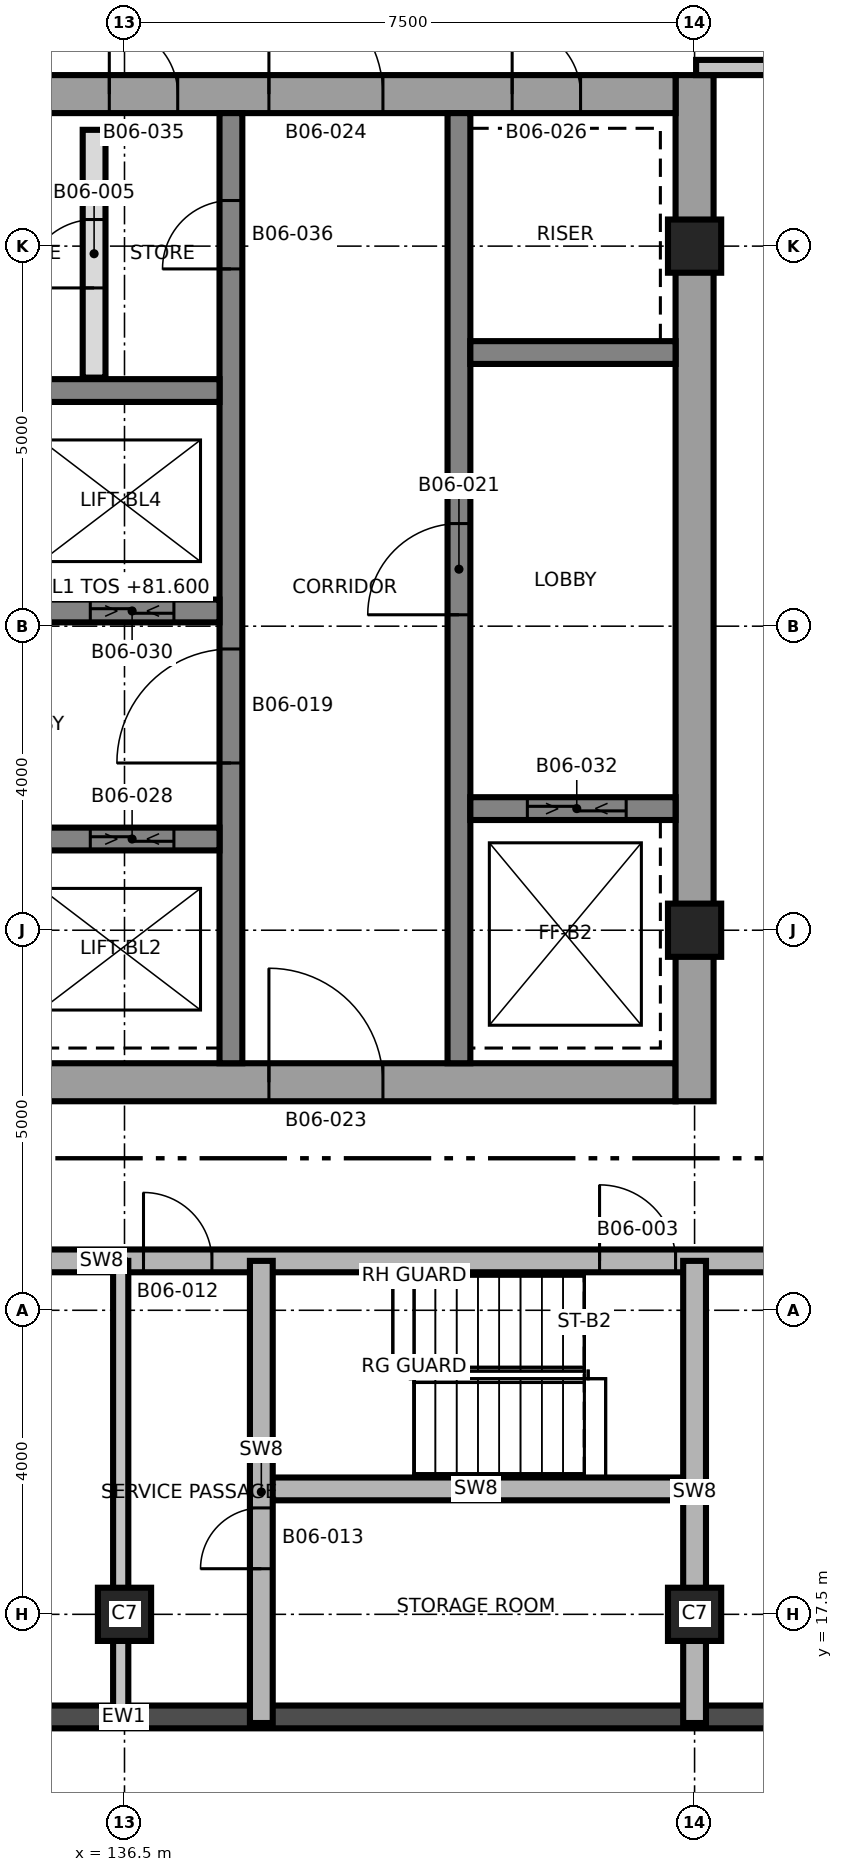
"""IFC4 building model, lengths in metres.
Left out: names, types, materials, properties, quantities, classifications, styles, units other than length and angle.
Written with IfcOpenShell. Run it as: python <this file> out.ifc"""

import sys

from ifc_helpers import new_model, si_unit, direction, frame, frame_2d, origin, origin_2d, place, context, subcontext, project, spatial, rectangle, extrude, element, fill, save


model = new_model("IFC4")
c1 = context("Model", 3, precision=1e-05, world=origin(), true_north=direction((0.0, 1.0)))
c2 = subcontext(c1, "Body", "Model", "MODEL_VIEW")
j1 = project(units=[si_unit("LENGTHUNIT", "METRE"), si_unit("PLANEANGLEUNIT", "RADIAN")], contexts=[c1])
p1 = place(None, origin())
s1 = spatial("IfcSite", under=j1, at=p1, CompositionType="ELEMENT")
p2 = place(p1, origin())
s2 = spatial("IfcBuilding", under=s1, at=p2, CompositionType="ELEMENT")
p3 = place(p2, frame((0.0, 0.0, 81.6)))
s3 = spatial("IfcBuildingStorey", under=s2, at=p3, CompositionType="ELEMENT", Elevation=81.6)
p4 = place(p3, frame((128.75, 24.5, 0.0), z_axis=(0.0, 0.0, 1.0), x_axis=(1.0, 0.0, 0.0)))
e1 = element("IfcWall", 1, at=p4, inside=s3, PredefinedType="SHEAR", context=c2, shape_type="SweptSolid", body=[
    extrude(rectangle(XDim=15.0, YDim=0.5, at=frame_2d((7.5, 0.0))), origin(), (0.0, 0.0, 1.0), 5.5),
])
p5 = place(p4, frame((9.65, 0.0, 0.0)))
e2 = element("IfcOpeningElement", 2, at=p5, cuts=e1, PredefinedType="OPENING", context=c2, shape_type="SweptSolid", body=[
    extrude(rectangle(XDim=1.5, YDim=2.1, at=frame_2d((0.75, 1.05))), frame((0.0, 0.26, 0.0), z_axis=(0.0, -1.0, 0.0), x_axis=(1.0, 0.0, 0.0)), (0.0, 0.0, 1.0), 0.52),
])
p6 = place(p4, frame((1.25, 0.0, 0.0)))
e3 = element("IfcOpeningElement", 3, at=p6, cuts=e1, PredefinedType="OPENING", context=c2, shape_type="SweptSolid", body=[
    extrude(rectangle(XDim=0.9, YDim=2.1, at=frame_2d((0.45, 1.05))), frame((0.0, 0.26, 0.0), z_axis=(0.0, -1.0, 0.0), x_axis=(1.0, 0.0, 0.0)), (0.0, 0.0, 1.0), 0.52),
])
p7 = place(p3, frame((144.0, 24.25, 0.0), z_axis=(0.0, 0.0, 1.0), x_axis=(0.0, 1.0, 0.0)))
e4 = element("IfcWall", 4, at=p7, inside=s3, PredefinedType="SHEAR", context=c2, shape_type="SweptSolid", body=[
    extrude(rectangle(XDim=13.5, YDim=0.5, at=frame_2d((6.75, 0.0))), origin(), (0.0, 0.0, 1.0), 5.5),
])
p8 = place(p3, frame((128.75, 37.5, 0.0), z_axis=(0.0, 0.0, 1.0), x_axis=(1.0, 0.0, 0.0)))
e5 = element("IfcWall", 5, at=p8, inside=s3, PredefinedType="SHEAR", context=c2, shape_type="SweptSolid", body=[
    extrude(rectangle(XDim=15.0, YDim=0.5, at=frame_2d((7.5, 0.0))), origin(), (0.0, 0.0, 1.0), 5.5),
])
p9 = place(p8, frame((9.65, 0.0, 0.0)))
e6 = element("IfcOpeningElement", 6, at=p9, cuts=e5, PredefinedType="OPENING", context=c2, shape_type="SweptSolid", body=[
    extrude(rectangle(XDim=1.5, YDim=2.1, at=frame_2d((0.75, 1.05))), frame((0.0, 0.26, 0.0), z_axis=(0.0, -1.0, 0.0), x_axis=(1.0, 0.0, 0.0)), (0.0, 0.0, 1.0), 0.52),
])
p10 = place(p8, frame((12.85, 0.0, 0.0)))
e7 = element("IfcOpeningElement", 7, at=p10, cuts=e5, PredefinedType="OPENING", context=c2, shape_type="SweptSolid", body=[
    extrude(rectangle(XDim=0.9, YDim=2.1, at=frame_2d((0.45, 1.05))), frame((0.0, 0.26, 0.0), z_axis=(0.0, -1.0, 0.0), x_axis=(1.0, 0.0, 0.0)), (0.0, 0.0, 1.0), 0.52),
])
p11 = place(p8, frame((3.8, 0.0, 0.0)))
e8 = element("IfcOpeningElement", 8, at=p11, cuts=e5, PredefinedType="OPENING", context=c2, shape_type="SweptSolid", body=[
    extrude(rectangle(XDim=0.9, YDim=2.1, at=frame_2d((0.45, 1.05))), frame((0.0, 0.26, 0.0), z_axis=(0.0, -1.0, 0.0), x_axis=(1.0, 0.0, 0.0)), (0.0, 0.0, 1.0), 0.52),
])
p12 = place(p8, frame((5.8, 0.0, 0.0)))
e9 = element("IfcOpeningElement", 9, at=p12, cuts=e5, PredefinedType="OPENING", context=c2, shape_type="SweptSolid", body=[
    extrude(rectangle(XDim=0.9, YDim=2.1, at=frame_2d((0.45, 1.05))), frame((0.0, 0.26, 0.0), z_axis=(0.0, -1.0, 0.0), x_axis=(1.0, 0.0, 0.0)), (0.0, 0.0, 1.0), 0.52),
])
p13 = place(p8, frame((7.55, 0.0, 0.0)))
e10 = element("IfcOpeningElement", 10, at=p13, cuts=e5, PredefinedType="OPENING", context=c2, shape_type="SweptSolid", body=[
    extrude(rectangle(XDim=0.9, YDim=2.1, at=frame_2d((0.45, 1.05))), frame((0.0, 0.26, 0.0), z_axis=(0.0, -1.0, 0.0), x_axis=(1.0, 0.0, 0.0)), (0.0, 0.0, 1.0), 0.52),
])
p14 = place(p3, frame((137.9, 24.75, 0.0), z_axis=(0.0, 0.0, 1.0), x_axis=(0.0, 1.0, 0.0)))
e11 = element("IfcWall", 11, at=p14, inside=s3, PredefinedType="SHEAR", context=c2, shape_type="SweptSolid", body=[
    extrude(rectangle(XDim=12.5, YDim=0.3, at=frame_2d((6.25, 0.0))), origin(), (0.0, 0.0, 1.0), 5.5),
])
p15 = place(p14, frame((3.95, 0.0, 0.0)))
e12 = element("IfcOpeningElement", 12, at=p15, cuts=e11, PredefinedType="OPENING", context=c2, shape_type="SweptSolid", body=[
    extrude(rectangle(XDim=1.5, YDim=2.1, at=frame_2d((0.75, 1.05))), frame((0.0, 0.16, 0.0), z_axis=(0.0, -1.0, 0.0), x_axis=(1.0, 0.0, 0.0)), (0.0, 0.0, 1.0), 0.32),
])
p16 = place(p14, frame((10.45, 0.0, 0.0)))
e13 = element("IfcOpeningElement", 13, at=p16, cuts=e11, PredefinedType="OPENING", context=c2, shape_type="SweptSolid", body=[
    extrude(rectangle(XDim=0.9, YDim=2.1, at=frame_2d((0.45, 1.05))), frame((0.0, 0.16, 0.0), z_axis=(0.0, -1.0, 0.0), x_axis=(1.0, 0.0, 0.0)), (0.0, 0.0, 1.0), 0.32),
])
p17 = place(p3, frame((140.9, 24.75, 0.0), z_axis=(0.0, 0.0, 1.0), x_axis=(0.0, 1.0, 0.0)))
e14 = element("IfcWall", 14, at=p17, inside=s3, PredefinedType="SHEAR", context=c2, shape_type="SweptSolid", body=[
    extrude(rectangle(XDim=12.5, YDim=0.3, at=frame_2d((6.25, 0.0))), origin(), (0.0, 0.0, 1.0), 5.5),
])
p18 = place(p17, frame((5.9, 0.0, 0.0)))
e15 = element("IfcOpeningElement", 15, at=p18, cuts=e14, PredefinedType="OPENING", context=c2, shape_type="SweptSolid", body=[
    extrude(rectangle(XDim=1.2, YDim=2.1, at=frame_2d((0.6, 1.05))), frame((0.0, 0.16, 0.0), z_axis=(0.0, -1.0, 0.0), x_axis=(1.0, 0.0, 0.0)), (0.0, 0.0, 1.0), 0.32),
])
p19 = place(p3, frame((132.25, 27.7, 0.0), z_axis=(0.0, 0.0, 1.0), x_axis=(1.0, 0.0, 0.0)))
e16 = element("IfcWall", 16, at=p19, inside=s3, PredefinedType="SHEAR", context=c2, shape_type="SweptSolid", body=[
    extrude(rectangle(XDim=5.5, YDim=0.3, at=frame_2d((2.75, 0.0))), origin(), (0.0, 0.0, 1.0), 5.5),
])
p20 = place(p19, frame((0.9, 0.0, 0.0)))
e17 = element("IfcOpeningElement", 17, at=p20, cuts=e16, PredefinedType="OPENING", context=c2, shape_type="SweptSolid", body=[
    extrude(rectangle(XDim=1.1, YDim=2.4, at=frame_2d((0.55, 1.2))), frame((0.0, 0.16, 0.0), z_axis=(0.0, -1.0, 0.0), x_axis=(1.0, 0.0, 0.0)), (0.0, 0.0, 1.0), 0.32),
])
p21 = place(p19, frame((3.8, 0.0, 0.0)))
e18 = element("IfcOpeningElement", 18, at=p21, cuts=e16, PredefinedType="OPENING", context=c2, shape_type="SweptSolid", body=[
    extrude(rectangle(XDim=1.1, YDim=2.4, at=frame_2d((0.55, 1.2))), frame((0.0, 0.16, 0.0), z_axis=(0.0, -1.0, 0.0), x_axis=(1.0, 0.0, 0.0)), (0.0, 0.0, 1.0), 0.32),
])
p22 = place(p3, frame((132.25, 30.7, 0.0), z_axis=(0.0, 0.0, 1.0), x_axis=(1.0, 0.0, 0.0)))
e19 = element("IfcWall", 19, at=p22, inside=s3, PredefinedType="SHEAR", context=c2, shape_type="SweptSolid", body=[
    extrude(rectangle(XDim=5.5, YDim=0.3, at=frame_2d((2.75, 0.0))), origin(), (0.0, 0.0, 1.0), 5.5),
])
p23 = place(p22, frame((0.9, 0.0, 0.0)))
e20 = element("IfcOpeningElement", 20, at=p23, cuts=e19, PredefinedType="OPENING", context=c2, shape_type="SweptSolid", body=[
    extrude(rectangle(XDim=1.1, YDim=2.4, at=frame_2d((0.55, 1.2))), frame((0.0, 0.16, 0.0), z_axis=(0.0, -1.0, 0.0), x_axis=(1.0, 0.0, 0.0)), (0.0, 0.0, 1.0), 0.32),
])
p24 = place(p22, frame((3.8, 0.0, 0.0)))
e21 = element("IfcOpeningElement", 21, at=p24, cuts=e19, PredefinedType="OPENING", context=c2, shape_type="SweptSolid", body=[
    extrude(rectangle(XDim=1.1, YDim=2.4, at=frame_2d((0.55, 1.2))), frame((0.0, 0.16, 0.0), z_axis=(0.0, -1.0, 0.0), x_axis=(1.0, 0.0, 0.0)), (0.0, 0.0, 1.0), 0.32),
])
p25 = place(p3, frame((132.25, 33.6, 0.0), z_axis=(0.0, 0.0, 1.0), x_axis=(1.0, 0.0, 0.0)))
e22 = element("IfcWall", 22, at=p25, inside=s3, PredefinedType="SHEAR", context=c2, shape_type="SweptSolid", body=[
    extrude(rectangle(XDim=5.5, YDim=0.3, at=frame_2d((2.75, 0.0))), origin(), (0.0, 0.0, 1.0), 5.5),
])
p26 = place(p3, frame((141.05, 28.1, 0.0), z_axis=(0.0, 0.0, 1.0), x_axis=(1.0, 0.0, 0.0)))
e23 = element("IfcWall", 23, at=p26, inside=s3, PredefinedType="SHEAR", context=c2, shape_type="SweptSolid", body=[
    extrude(rectangle(XDim=2.7, YDim=0.3, at=frame_2d((1.35, 0.0))), origin(), (0.0, 0.0, 1.0), 5.5),
])
p27 = place(p26, frame((0.75, 0.0, 0.0)))
e24 = element("IfcOpeningElement", 24, at=p27, cuts=e23, PredefinedType="OPENING", context=c2, shape_type="SweptSolid", body=[
    extrude(rectangle(XDim=1.3, YDim=2.4, at=frame_2d((0.65, 1.2))), frame((0.0, 0.16, 0.0), z_axis=(0.0, -1.0, 0.0), x_axis=(1.0, 0.0, 0.0)), (0.0, 0.0, 1.0), 0.32),
])
p28 = place(p3, frame((141.05, 34.1, 0.0), z_axis=(0.0, 0.0, 1.0), x_axis=(1.0, 0.0, 0.0)))
e25 = element("IfcWall", 25, at=p28, inside=s3, PredefinedType="SHEAR", context=c2, shape_type="SweptSolid", body=[
    extrude(rectangle(XDim=2.7, YDim=0.3, at=frame_2d((1.35, 0.0))), origin(), (0.0, 0.0, 1.0), 5.5),
])
for number, where, z_axis, x_axis in (
    (26, (136.5, 17.5, 0.0), (0.0, 0.0, 1.0), (1.0, 0.0, 0.0)),
    (27, (144.0, 17.5, 0.0), (0.0, 0.0, 1.0), (1.0, 0.0, 0.0)),
    (28, (144.0, 26.5, 0.0), (0.0, 0.0, 1.0), (1.0, 0.0, 0.0)),
    (29, (144.0, 35.5, 0.0), (0.0, 0.0, 1.0), (1.0, 0.0, 0.0)),
):
    element("IfcColumn", number, at=place(p3, frame(where, z_axis=z_axis, x_axis=x_axis)), inside=s3, PredefinedType="COLUMN", context=c2, shape_type="SweptSolid", body=[
        extrude(rectangle(XDim=0.7, YDim=0.7, at=origin_2d()), origin(), (0.0, 0.0, 1.0), 5.5),
    ])
p29 = place(p3, frame((126.048, 16.15, 0.0), z_axis=(0.0, 0.0, 1.0), x_axis=(1.0, 0.0, 0.0)))
e30 = element("IfcWall", 30, at=p29, inside=s3, PredefinedType="SOLIDWALL", context=c2, shape_type="SweptSolid", body=[
    extrude(rectangle(XDim=20.88, YDim=0.3, at=frame_2d((10.44, 0.0))), origin(), (0.0, 0.0, 1.0), 5.2),
])
p30 = place(p3, frame((138.25, 19.15, 0.0), z_axis=(0.0, 0.0, 1.0), x_axis=(1.0, 0.0, 0.0)))
e31 = element("IfcWall", 31, at=p30, inside=s3, PredefinedType="SHEAR", context=c2, shape_type="SweptSolid", body=[
    extrude(rectangle(XDim=5.75, YDim=0.3, at=frame_2d((2.875, 0.0))), origin(), (0.0, 0.0, 1.0), 5.2),
])
p31 = place(p3, frame((120.07, 22.15, 0.0), z_axis=(0.0, 0.0, 1.0), x_axis=(1.0, 0.0, 0.0)))
e32 = element("IfcWall", 32, at=p31, inside=s3, PredefinedType="SHEAR", context=c2, shape_type="SweptSolid", body=[
    extrude(rectangle(XDim=32.86, YDim=0.3, at=frame_2d((16.43, 0.0))), origin(), (0.0, 0.0, 1.0), 5.2),
])
p32 = place(p31, frame((22.68, 0.0, 0.0)))
e33 = element("IfcOpeningElement", 33, at=p32, cuts=e32, PredefinedType="OPENING", context=c2, shape_type="SweptSolid", body=[
    extrude(rectangle(XDim=1.0, YDim=2.1, at=frame_2d((0.5, 1.05))), frame((0.0, 0.16, 0.0), z_axis=(0.0, -1.0, 0.0), x_axis=(1.0, 0.0, 0.0)), (0.0, 0.0, 1.0), 0.32),
])
p33 = place(p31, frame((6.73, 0.0, 0.0)))
e34 = element("IfcOpeningElement", 34, at=p33, cuts=e32, PredefinedType="OPENING", context=c2, shape_type="SweptSolid", body=[
    extrude(rectangle(XDim=1.4, YDim=2.1, at=frame_2d((0.7, 1.05))), frame((0.0, 0.16, 0.0), z_axis=(0.0, -1.0, 0.0), x_axis=(1.0, 0.0, 0.0)), (0.0, 0.0, 1.0), 0.32),
])
p34 = place(p31, frame((12.23, 0.0, 0.0)))
e35 = element("IfcOpeningElement", 35, at=p34, cuts=e32, PredefinedType="OPENING", context=c2, shape_type="SweptSolid", body=[
    extrude(rectangle(XDim=1.4, YDim=2.1, at=frame_2d((0.7, 1.05))), frame((0.0, 0.16, 0.0), z_axis=(0.0, -1.0, 0.0), x_axis=(1.0, 0.0, 0.0)), (0.0, 0.0, 1.0), 0.32),
])
p35 = place(p31, frame((25.23, 0.0, 0.0)))
e36 = element("IfcOpeningElement", 36, at=p35, cuts=e32, PredefinedType="OPENING", context=c2, shape_type="SweptSolid", body=[
    extrude(rectangle(XDim=1.4, YDim=2.1, at=frame_2d((0.7, 1.05))), frame((0.0, 0.16, 0.0), z_axis=(0.0, -1.0, 0.0), x_axis=(1.0, 0.0, 0.0)), (0.0, 0.0, 1.0), 0.32),
])
p36 = place(p31, frame((16.68, 0.0, 0.0)))
e37 = element("IfcOpeningElement", 37, at=p36, cuts=e32, PredefinedType="OPENING", context=c2, shape_type="SweptSolid", body=[
    extrude(rectangle(XDim=0.9, YDim=2.1, at=frame_2d((0.45, 1.05))), frame((0.0, 0.16, 0.0), z_axis=(0.0, -1.0, 0.0), x_axis=(1.0, 0.0, 0.0)), (0.0, 0.0, 1.0), 0.32),
])
p37 = place(p3, frame((144.02, 37.85, 0.0), z_axis=(0.0, 0.0, 1.0), x_axis=(1.0, 0.0, 0.0)))
e38 = element("IfcWall", 38, at=p37, inside=s3, PredefinedType="PARTITIONING", context=c2, shape_type="SweptSolid", body=[
    extrude(rectangle(XDim=3.23, YDim=0.2, at=frame_2d((1.615, 0.0))), origin(), (0.0, 0.0, 1.0), 5.2),
])
p38 = place(p37, frame((1.03, 0.0, 0.0)))
e39 = element("IfcOpeningElement", 39, at=p38, cuts=e38, PredefinedType="OPENING", context=c2, shape_type="SweptSolid", body=[
    extrude(rectangle(XDim=1.5, YDim=2.1, at=frame_2d((0.75, 1.05))), frame((0.0, 0.11, 0.0), z_axis=(0.0, -1.0, 0.0), x_axis=(1.0, 0.0, 0.0)), (0.0, 0.0, 1.0), 0.22),
])
p39 = place(p3, frame((136.1, 33.77, 0.0), z_axis=(0.0, 0.0, 1.0), x_axis=(0.0, 1.0, 0.0)))
e40 = element("IfcWall", 40, at=p39, inside=s3, PredefinedType="PARTITIONING", context=c2, shape_type="SweptSolid", body=[
    extrude(rectangle(XDim=3.26, YDim=0.3, at=frame_2d((1.63, 0.0))), origin(), (0.0, 0.0, 1.0), 5.2),
])
p40 = place(p39, frame((1.18, 0.0, 0.0)))
e41 = element("IfcOpeningElement", 41, at=p40, cuts=e40, PredefinedType="OPENING", context=c2, shape_type="SweptSolid", body=[
    extrude(rectangle(XDim=0.9, YDim=2.1, at=frame_2d((0.45, 1.05))), frame((0.0, 0.16, 0.0), z_axis=(0.0, -1.0, 0.0), x_axis=(1.0, 0.0, 0.0)), (0.0, 0.0, 1.0), 0.32),
])
p41 = place(p3, frame((136.45, 16.07, 0.0), z_axis=(0.0, 0.0, 1.0), x_axis=(0.0, 1.0, 0.0)))
e42 = element("IfcWall", 42, at=p41, inside=s3, PredefinedType="PARTITIONING", context=c2, shape_type="SweptSolid", body=[
    extrude(rectangle(XDim=6.08, YDim=0.2, at=frame_2d((3.04, 0.0))), origin(), (0.0, 0.0, 1.0), 5.2),
])
p42 = place(p3, frame((138.3, 16.07, 0.0), z_axis=(0.0, 0.0, 1.0), x_axis=(0.0, 1.0, 0.0)))
e43 = element("IfcWall", 43, at=p42, inside=s3, PredefinedType="SHEAR", context=c2, shape_type="SweptSolid", body=[
    extrude(rectangle(XDim=6.08, YDim=0.3, at=frame_2d((3.04, 0.0))), origin(), (0.0, 0.0, 1.0), 5.2),
])
p43 = place(p42, frame((2.03, 0.0, 0.0)))
e44 = element("IfcOpeningElement", 44, at=p43, cuts=e43, PredefinedType="OPENING", context=c2, shape_type="SweptSolid", body=[
    extrude(rectangle(XDim=0.8, YDim=2.1, at=frame_2d((0.4, 1.05))), frame((0.0, 0.16, 0.0), z_axis=(0.0, -1.0, 0.0), x_axis=(1.0, 0.0, 0.0)), (0.0, 0.0, 1.0), 0.32),
])
p44 = place(p3, frame((144.0, 16.07, 0.0), z_axis=(0.0, 0.0, 1.0), x_axis=(0.0, 1.0, 0.0)))
e45 = element("IfcWall", 45, at=p44, inside=s3, PredefinedType="SHEAR", context=c2, shape_type="SweptSolid", body=[
    extrude(rectangle(XDim=6.08, YDim=0.3, at=frame_2d((3.04, 0.0))), origin(), (0.0, 0.0, 1.0), 5.2),
])
p45 = place(p32, origin())
e46 = element("IfcDoor", 46, at=p45, inside=s3, OperationType="SINGLE_SWING_LEFT", PredefinedType="DOOR", context=c2, shape_type="SweptSolid", body=[
    extrude(rectangle(XDim=1.0, YDim=2.1, at=frame_2d((0.5, 1.05))), frame((0.0, 0.025, 0.0), z_axis=(0.0, -1.0, 0.0), x_axis=(1.0, 0.0, 0.0)), (0.0, 0.0, 1.0), 0.05),
])
fill(e33, e46)
p46 = place(p40, origin())
e47 = element("IfcDoor", 47, at=p46, inside=s3, OperationType="SINGLE_SWING_LEFT", PredefinedType="DOOR", context=c2, shape_type="SweptSolid", body=[
    extrude(rectangle(XDim=0.9, YDim=2.1, at=frame_2d((0.45, 1.05))), frame((0.0, 0.025, 0.0), z_axis=(0.0, -1.0, 0.0), x_axis=(1.0, 0.0, 0.0)), (0.0, 0.0, 1.0), 0.05),
])
fill(e41, e47)
p47 = place(p36, origin())
e48 = element("IfcDoor", 48, at=p47, inside=s3, OperationType="SINGLE_SWING_RIGHT", PredefinedType="DOOR", context=c2, shape_type="SweptSolid", body=[
    extrude(rectangle(XDim=0.9, YDim=2.1, at=frame_2d((0.45, 1.05))), frame((0.0, 0.025, 0.0), z_axis=(0.0, -1.0, 0.0), x_axis=(1.0, 0.0, 0.0)), (0.0, 0.0, 1.0), 0.05),
])
fill(e37, e48)
p48 = place(p43, origin())
e49 = element("IfcDoor", 49, at=p48, inside=s3, OperationType="SINGLE_SWING_LEFT", PredefinedType="DOOR", context=c2, shape_type="SweptSolid", body=[
    extrude(rectangle(XDim=0.8, YDim=2.1, at=frame_2d((0.4, 1.05))), frame((0.0, 0.025, 0.0), z_axis=(0.0, -1.0, 0.0), x_axis=(1.0, 0.0, 0.0)), (0.0, 0.0, 1.0), 0.05),
])
fill(e44, e49)
p49 = place(p15, origin())
e50 = element("IfcDoor", 50, at=p49, inside=s3, OperationType="SINGLE_SWING_RIGHT", PredefinedType="DOOR", context=c2, shape_type="SweptSolid", body=[
    extrude(rectangle(XDim=1.5, YDim=2.1, at=frame_2d((0.75, 1.05))), frame((0.0, 0.025, 0.0), z_axis=(0.0, -1.0, 0.0), x_axis=(1.0, 0.0, 0.0)), (0.0, 0.0, 1.0), 0.05),
])
fill(e12, e50)
p50 = place(p18, origin())
e51 = element("IfcDoor", 51, at=p50, inside=s3, OperationType="SINGLE_SWING_RIGHT", PredefinedType="DOOR", context=c2, shape_type="SweptSolid", body=[
    extrude(rectangle(XDim=1.2, YDim=2.1, at=frame_2d((0.6, 1.05))), frame((0.0, 0.025, 0.0), z_axis=(0.0, -1.0, 0.0), x_axis=(1.0, 0.0, 0.0)), (0.0, 0.0, 1.0), 0.05),
])
fill(e15, e51)
p51 = place(p5, origin())
e52 = element("IfcDoor", 52, at=p51, inside=s3, OperationType="SINGLE_SWING_LEFT", PredefinedType="DOOR", context=c2, shape_type="SweptSolid", body=[
    extrude(rectangle(XDim=1.5, YDim=2.1, at=frame_2d((0.75, 1.05))), frame((0.0, 0.025, 0.0), z_axis=(0.0, -1.0, 0.0), x_axis=(1.0, 0.0, 0.0)), (0.0, 0.0, 1.0), 0.05),
])
fill(e2, e52)
p52 = place(p9, origin())
e53 = element("IfcDoor", 53, at=p52, inside=s3, OperationType="SINGLE_SWING_RIGHT", PredefinedType="DOOR", context=c2, shape_type="SweptSolid", body=[
    extrude(rectangle(XDim=1.5, YDim=2.1, at=frame_2d((0.75, 1.05))), frame((0.0, 0.025, 0.0), z_axis=(0.0, -1.0, 0.0), x_axis=(1.0, 0.0, 0.0)), (0.0, 0.0, 1.0), 0.05),
])
fill(e6, e53)
p53 = place(p10, origin())
e54 = element("IfcDoor", 54, at=p53, inside=s3, OperationType="SINGLE_SWING_RIGHT", PredefinedType="DOOR", context=c2, shape_type="SweptSolid", body=[
    extrude(rectangle(XDim=0.9, YDim=2.1, at=frame_2d((0.45, 1.05))), frame((0.0, 0.025, 0.0), z_axis=(0.0, -1.0, 0.0), x_axis=(1.0, 0.0, 0.0)), (0.0, 0.0, 1.0), 0.05),
])
fill(e7, e54)
p54 = place(p21, origin())
e55 = element("IfcDoor", 55, at=p54, inside=s3, OperationType="SLIDING_TO_LEFT", PredefinedType="DOOR", context=c2, shape_type="SweptSolid", body=[
    extrude(rectangle(XDim=1.1, YDim=2.4, at=frame_2d((0.55, 1.2))), frame((0.0, 0.025, 0.0), z_axis=(0.0, -1.0, 0.0), x_axis=(1.0, 0.0, 0.0)), (0.0, 0.0, 1.0), 0.05),
])
fill(e18, e55)
p55 = place(p24, origin())
e56 = element("IfcDoor", 56, at=p55, inside=s3, OperationType="SLIDING_TO_LEFT", PredefinedType="DOOR", context=c2, shape_type="SweptSolid", body=[
    extrude(rectangle(XDim=1.1, YDim=2.4, at=frame_2d((0.55, 1.2))), frame((0.0, 0.025, 0.0), z_axis=(0.0, -1.0, 0.0), x_axis=(1.0, 0.0, 0.0)), (0.0, 0.0, 1.0), 0.05),
])
fill(e21, e56)
p56 = place(p27, origin())
e57 = element("IfcDoor", 57, at=p56, inside=s3, OperationType="SLIDING_TO_LEFT", PredefinedType="DOOR", context=c2, shape_type="SweptSolid", body=[
    extrude(rectangle(XDim=1.3, YDim=2.4, at=frame_2d((0.65, 1.2))), frame((0.0, 0.025, 0.0), z_axis=(0.0, -1.0, 0.0), x_axis=(1.0, 0.0, 0.0)), (0.0, 0.0, 1.0), 0.05),
])
fill(e24, e57)
p57 = place(p13, origin())
e58 = element("IfcDoor", 58, at=p57, inside=s3, OperationType="SINGLE_SWING_LEFT", PredefinedType="DOOR", context=c2, shape_type="SweptSolid", body=[
    extrude(rectangle(XDim=0.9, YDim=2.1, at=frame_2d((0.45, 1.05))), frame((0.0, 0.025, 0.0), z_axis=(0.0, -1.0, 0.0), x_axis=(1.0, 0.0, 0.0)), (0.0, 0.0, 1.0), 0.05),
])
fill(e10, e58)
p58 = place(p16, origin())
e59 = element("IfcDoor", 59, at=p58, inside=s3, OperationType="SINGLE_SWING_RIGHT", PredefinedType="DOOR", context=c2, shape_type="SweptSolid", body=[
    extrude(rectangle(XDim=0.9, YDim=2.1, at=frame_2d((0.45, 1.05))), frame((0.0, 0.025, 0.0), z_axis=(0.0, -1.0, 0.0), x_axis=(1.0, 0.0, 0.0)), (0.0, 0.0, 1.0), 0.05),
])
fill(e13, e59)
save(model, sys.argv[1])
